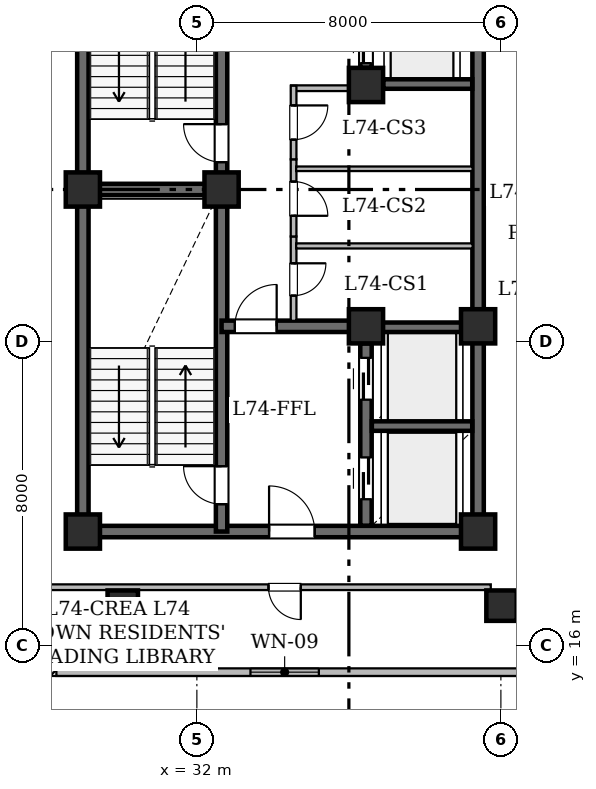
"""IFC4 building model, lengths in metres.
Left out: names, types, materials, properties, quantities, classifications, styles, units other than length and angle.
Written with IfcOpenShell. Run it as: python <this file> out.ifc"""

import sys

from ifc_helpers import new_model, si_unit, direction, frame, frame_2d, origin, origin_2d, place, context, subcontext, project, spatial, rectangle, hollow_rectangle, extrude, element, fill, save


model = new_model("IFC4")
c1 = context("Model", 3, precision=1e-05, world=origin(), true_north=direction((0.0, 1.0)))
c2 = subcontext(c1, "Body", "Model", "MODEL_VIEW")
j1 = project(units=[si_unit("LENGTHUNIT", "METRE"), si_unit("PLANEANGLEUNIT", "RADIAN")], contexts=[c1])
p1 = place(None, origin())
s1 = spatial("IfcSite", under=j1, at=p1, CompositionType="ELEMENT")
p2 = place(p1, origin())
s2 = spatial("IfcBuilding", under=s1, at=p2, CompositionType="ELEMENT")
p3 = place(p2, frame((0.0, 0.0, 290.45)))
s3 = spatial("IfcBuildingStorey", under=s2, at=p3, CompositionType="ELEMENT", Elevation=290.45)
for number, where, z_axis, x_axis in (
    (1, (29.0, 19.0, 0.0), (0.0, 0.0, 1.0), (1.0, 0.0, 0.0)),
    (2, (32.65, 28.0, 0.0), (0.0, 0.0, 1.0), (1.0, 0.0, 0.0)),
    (3, (39.4, 19.0, 0.0), (0.0, 0.0, 1.0), (1.0, 0.0, 0.0)),
    (4, (29.0, 28.0, 0.0), (0.0, 0.0, 1.0), (1.0, 0.0, 0.0)),
    (5, (36.45, 24.4, 0.0), (0.0, 0.0, 1.0), (1.0, 0.0, 0.0)),
    (6, (39.4, 24.4, 0.0), (0.0, 0.0, 1.0), (1.0, 0.0, 0.0)),
    (7, (36.45, 30.75, 0.0), (0.0, 0.0, 1.0), (1.0, 0.0, 0.0)),
):
    element("IfcColumn", number, at=place(p3, frame(where, z_axis=z_axis, x_axis=x_axis)), inside=s3, PredefinedType="COLUMN", context=c2, shape_type="SweptSolid", body=[
        extrude(hollow_rectangle(XDim=0.9, YDim=0.9, WallThickness=0.045, at=origin_2d()), origin(), (0.0, 0.0, 1.0), 4.2),
    ])
for number, where, z_axis, x_axis in (
    (8, (30.05, 17.05, 0.0), (0.0, 0.0, 1.0), (1.0, 0.0, 0.0)),
    (9, (40.017, 17.05, 0.0), (0.0, 0.0, 1.0), (1.0, 0.0, 0.0)),
):
    element("IfcColumn", number, at=place(p3, frame(where, z_axis=z_axis, x_axis=x_axis)), inside=s3, PredefinedType="COLUMN", context=c2, shape_type="SweptSolid", body=[
        extrude(hollow_rectangle(XDim=0.8, YDim=0.8, WallThickness=0.04, at=origin_2d()), origin(), (0.0, 0.0, 1.0), 4.175),
    ])
p4 = place(p3, frame((28.241, 15.3, 0.0), z_axis=(0.0, 0.0, 1.0), x_axis=(-0.707106781187, 0.707106781187, 0.0)))
e10 = element("IfcWall", 10, at=p4, inside=s3, PredefinedType="STANDARD", context=c2, shape_type="SweptSolid", body=[
    extrude(rectangle(XDim=4.442, YDim=0.2, at=frame_2d((2.221, 0.0))), origin(), (0.0, 0.0, 1.0), 3.78),
])
p5 = place(p3, frame((61.696, 15.3, 0.0), z_axis=(0.0, 0.0, 1.0), x_axis=(-1.0, 0.0, 0.0)))
e11 = element("IfcWall", 11, at=p5, inside=s3, PredefinedType="STANDARD", context=c2, shape_type="SweptSolid", body=[
    extrude(rectangle(XDim=33.393, YDim=0.2, at=frame_2d((16.697, 0.0))), origin(), (0.0, 0.0, 1.0), 3.78),
])
p6 = place(p5, frame((26.486, 0.0, 0.85)))
e12 = element("IfcOpeningElement", 12, at=p6, cuts=e11, PredefinedType="OPENING", context=c2, shape_type="SweptSolid", body=[
    extrude(rectangle(XDim=1.8, YDim=0.92, at=frame_2d((0.9, 0.46))), frame((0.0, 0.11, 0.0), z_axis=(0.0, -1.0, 0.0), x_axis=(1.0, 0.0, 0.0)), (0.0, 0.0, 1.0), 0.22),
])
p7 = place(p5, frame((12.686, 0.0, 0.85)))
e13 = element("IfcOpeningElement", 13, at=p7, cuts=e11, PredefinedType="OPENING", context=c2, shape_type="SweptSolid", body=[
    extrude(rectangle(XDim=1.8, YDim=0.92, at=frame_2d((0.9, 0.46))), frame((0.0, 0.11, 0.0), z_axis=(0.0, -1.0, 0.0), x_axis=(1.0, 0.0, 0.0)), (0.0, 0.0, 1.0), 0.22),
])
p8 = place(p5, frame((7.048, 0.0, 0.85)))
e14 = element("IfcOpeningElement", 14, at=p8, cuts=e11, PredefinedType="OPENING", context=c2, shape_type="SweptSolid", body=[
    extrude(rectangle(XDim=1.8, YDim=0.92, at=frame_2d((0.9, 0.46))), frame((0.0, 0.11, 0.0), z_axis=(0.0, -1.0, 0.0), x_axis=(1.0, 0.0, 0.0)), (0.0, 0.0, 1.0), 0.22),
])
p9 = place(p5, frame((1.844, 0.0, 0.85)))
e15 = element("IfcOpeningElement", 15, at=p9, cuts=e11, PredefinedType="OPENING", context=c2, shape_type="SweptSolid", body=[
    extrude(rectangle(XDim=1.8, YDim=0.92, at=frame_2d((0.9, 0.46))), frame((0.0, 0.11, 0.0), z_axis=(0.0, -1.0, 0.0), x_axis=(1.0, 0.0, 0.0)), (0.0, 0.0, 1.0), 0.22),
])
for number, where, z_axis, x_axis in (
    (16, (29.0, 19.0, 0.0), (0.0, 0.0, 1.0), (0.0, 1.0, 0.0)),
    (17, (29.0, 28.0, 0.0), (0.0, 0.0, 1.0), (0.0, 1.0, 0.0)),
):
    element("IfcWall", number, at=place(p3, frame(where, z_axis=z_axis, x_axis=x_axis)), inside=s3, PredefinedType="SHEAR", context=c2, shape_type="SweptSolid", body=[
        extrude(rectangle(XDim=9.0, YDim=0.3, at=frame_2d((4.5, 0.0))), origin(), (0.0, 0.0, 1.0), 3.78),
    ])
p10 = place(p3, frame((29.0, 19.0, 0.0), z_axis=(0.0, 0.0, 1.0), x_axis=(1.0, 0.0, 0.0)))
e18 = element("IfcWall", 18, at=p10, inside=s3, PredefinedType="SHEAR", context=c2, shape_type="SweptSolid", body=[
    extrude(rectangle(XDim=10.4, YDim=0.3, at=frame_2d((5.2, 0.0))), origin(), (0.0, 0.0, 1.0), 3.78),
])
p11 = place(p10, frame((4.9, 0.0, 0.0)))
e19 = element("IfcOpeningElement", 19, at=p11, cuts=e18, PredefinedType="OPENING", context=c2, shape_type="SweptSolid", body=[
    extrude(rectangle(XDim=1.2, YDim=2.15, at=frame_2d((0.6, 1.075))), frame((0.0, 0.16, 0.0), z_axis=(0.0, -1.0, 0.0), x_axis=(1.0, 0.0, 0.0)), (0.0, 0.0, 1.0), 0.32),
])
p12 = place(p3, frame((39.4, 19.0, 0.0), z_axis=(0.0, 0.0, 1.0), x_axis=(0.0, 1.0, 0.0)))
e20 = element("IfcWall", 20, at=p12, inside=s3, PredefinedType="SHEAR", context=c2, shape_type="SweptSolid", body=[
    extrude(rectangle(XDim=5.4, YDim=0.3, at=frame_2d((2.7, 0.0))), origin(), (0.0, 0.0, 1.0), 3.78),
])
p13 = place(p3, frame((39.4, 24.4, 0.0), z_axis=(0.0, 0.0, 1.0), x_axis=(0.0, 1.0, 0.0)))
e21 = element("IfcWall", 21, at=p13, inside=s3, PredefinedType="SHEAR", context=c2, shape_type="SweptSolid", body=[
    extrude(rectangle(XDim=12.6, YDim=0.3, at=frame_2d((6.3, 0.0))), origin(), (0.0, 0.0, 1.0), 3.78),
])
p14 = place(p3, frame((32.65, 19.0, 0.0), z_axis=(0.0, 0.0, 1.0), x_axis=(0.0, 1.0, 0.0)))
e22 = element("IfcWall", 22, at=p14, inside=s3, PredefinedType="SHEAR", context=c2, shape_type="SweptSolid", body=[
    extrude(rectangle(XDim=9.0, YDim=0.3, at=frame_2d((4.5, 0.0))), origin(), (0.0, 0.0, 1.0), 3.78),
])
p15 = place(p14, frame((0.72, 0.0, 0.0)))
e23 = element("IfcOpeningElement", 23, at=p15, cuts=e22, PredefinedType="OPENING", context=c2, shape_type="SweptSolid", body=[
    extrude(rectangle(XDim=1.0, YDim=2.15, at=frame_2d((0.5, 1.075))), frame((0.0, 0.16, 0.0), z_axis=(0.0, -1.0, 0.0), x_axis=(1.0, 0.0, 0.0)), (0.0, 0.0, 1.0), 0.32),
])
p16 = place(p3, frame((32.65, 28.0, 0.0), z_axis=(0.0, 0.0, 1.0), x_axis=(0.0, 1.0, 0.0)))
e24 = element("IfcWall", 24, at=p16, inside=s3, PredefinedType="SHEAR", context=c2, shape_type="SweptSolid", body=[
    extrude(rectangle(XDim=9.0, YDim=0.3, at=frame_2d((4.5, 0.0))), origin(), (0.0, 0.0, 1.0), 3.78),
])
p17 = place(p16, frame((0.72, 0.0, 0.0)))
e25 = element("IfcOpeningElement", 25, at=p17, cuts=e24, PredefinedType="OPENING", context=c2, shape_type="SweptSolid", body=[
    extrude(rectangle(XDim=1.0, YDim=2.15, at=frame_2d((0.5, 1.075))), frame((0.0, 0.16, 0.0), z_axis=(0.0, -1.0, 0.0), x_axis=(1.0, 0.0, 0.0)), (0.0, 0.0, 1.0), 0.32),
])
p18 = place(p3, frame((29.0, 28.0, 0.0), z_axis=(0.0, 0.0, 1.0), x_axis=(1.0, 0.0, 0.0)))
e26 = element("IfcWall", 26, at=p18, inside=s3, PredefinedType="SHEAR", context=c2, shape_type="SweptSolid", body=[
    extrude(rectangle(XDim=3.65, YDim=0.3, at=frame_2d((1.825, 0.0))), origin(), (0.0, 0.0, 1.0), 3.78),
])
p19 = place(p3, frame((32.65, 24.4, 0.0), z_axis=(0.0, 0.0, 1.0), x_axis=(1.0, 0.0, 0.0)))
e27 = element("IfcWall", 27, at=p19, inside=s3, PredefinedType="SHEAR", context=c2, shape_type="SweptSolid", body=[
    extrude(rectangle(XDim=3.8, YDim=0.3, at=frame_2d((1.9, 0.0))), origin(), (0.0, 0.0, 1.0), 3.78),
])
p20 = place(p19, frame((0.35, 0.0, 0.0)))
e28 = element("IfcOpeningElement", 28, at=p20, cuts=e27, PredefinedType="OPENING", context=c2, shape_type="SweptSolid", body=[
    extrude(rectangle(XDim=1.1, YDim=2.15, at=frame_2d((0.55, 1.075))), frame((0.0, 0.16, 0.0), z_axis=(0.0, -1.0, 0.0), x_axis=(1.0, 0.0, 0.0)), (0.0, 0.0, 1.0), 0.32),
])
p21 = place(p3, frame((36.45, 19.154, 0.0), z_axis=(0.0, 0.0, 1.0), x_axis=(0.0, 1.0, 0.0)))
e29 = element("IfcWall", 29, at=p21, inside=s3, PredefinedType="SHEAR", context=c2, shape_type="SweptSolid", body=[
    extrude(rectangle(XDim=4.796, YDim=0.3, at=frame_2d((2.398, 0.0))), origin(), (0.0, 0.0, 1.0), 3.78),
])
p22 = place(p21, frame((0.696, 0.0, 0.0)))
e30 = element("IfcOpeningElement", 30, at=p22, cuts=e29, PredefinedType="OPENING", context=c2, shape_type="SweptSolid", body=[
    extrude(rectangle(XDim=1.1, YDim=2.15, at=frame_2d((0.55, 1.075))), frame((0.0, 0.16, 0.0), z_axis=(0.0, -1.0, 0.0), x_axis=(1.0, 0.0, 0.0)), (0.0, 0.0, 1.0), 0.32),
])
p23 = place(p21, frame((3.316, 0.0, 0.0)))
e31 = element("IfcOpeningElement", 31, at=p23, cuts=e29, PredefinedType="OPENING", context=c2, shape_type="SweptSolid", body=[
    extrude(rectangle(XDim=1.1, YDim=2.15, at=frame_2d((0.55, 1.075))), frame((0.0, 0.16, 0.0), z_axis=(0.0, -1.0, 0.0), x_axis=(1.0, 0.0, 0.0)), (0.0, 0.0, 1.0), 0.32),
])
p24 = place(p3, frame((36.45, 31.2, 0.0), z_axis=(0.0, 0.0, 1.0), x_axis=(0.0, 1.0, 0.0)))
e32 = element("IfcWall", 32, at=p24, inside=s3, PredefinedType="SHEAR", context=c2, shape_type="SweptSolid", body=[
    extrude(rectangle(XDim=5.646, YDim=0.3, at=frame_2d((2.823, 0.0))), origin(), (0.0, 0.0, 1.0), 3.78),
])
p25 = place(p24, frame((0.125, 0.0, 0.0)))
e33 = element("IfcOpeningElement", 33, at=p25, cuts=e32, PredefinedType="OPENING", context=c2, shape_type="SweptSolid", body=[
    extrude(rectangle(XDim=1.05, YDim=2.15, at=frame_2d((0.525, 1.075))), frame((0.0, 0.16, 0.0), z_axis=(0.0, -1.0, 0.0), x_axis=(1.0, 0.0, 0.0)), (0.0, 0.0, 1.0), 0.32),
])
p26 = place(p24, frame((2.175, 0.0, 0.0)))
e34 = element("IfcOpeningElement", 34, at=p26, cuts=e32, PredefinedType="OPENING", context=c2, shape_type="SweptSolid", body=[
    extrude(rectangle(XDim=1.05, YDim=2.15, at=frame_2d((0.525, 1.075))), frame((0.0, 0.16, 0.0), z_axis=(0.0, -1.0, 0.0), x_axis=(1.0, 0.0, 0.0)), (0.0, 0.0, 1.0), 0.32),
])
p27 = place(p24, frame((4.195, 0.0, 0.0)))
e35 = element("IfcOpeningElement", 35, at=p27, cuts=e32, PredefinedType="OPENING", context=c2, shape_type="SweptSolid", body=[
    extrude(rectangle(XDim=1.05, YDim=2.15, at=frame_2d((0.525, 1.075))), frame((0.0, 0.16, 0.0), z_axis=(0.0, -1.0, 0.0), x_axis=(1.0, 0.0, 0.0)), (0.0, 0.0, 1.0), 0.32),
])
for number, where, z_axis, x_axis in (
    (36, (36.604, 21.775, 0.0), (0.0, 0.0, 1.0), (1.0, 0.0, 0.0)),
    (37, (36.604, 24.375, 0.0), (0.0, 0.0, 1.0), (1.0, 0.0, 0.0)),
):
    element("IfcWall", number, at=place(p3, frame(where, z_axis=z_axis, x_axis=x_axis)), inside=s3, PredefinedType="SHEAR", context=c2, shape_type="SweptSolid", body=[
        extrude(rectangle(XDim=2.642, YDim=0.25, at=frame_2d((1.321, 0.0))), origin(), (0.0, 0.0, 1.0), 3.78),
    ])
p28 = place(p3, frame((36.904, 30.775, 0.0), z_axis=(0.0, 0.0, 1.0), x_axis=(1.0, 0.0, 0.0)))
e38 = element("IfcWall", 38, at=p28, inside=s3, PredefinedType="SHEAR", context=c2, shape_type="SweptSolid", body=[
    extrude(rectangle(XDim=2.342, YDim=0.25, at=frame_2d((1.171, 0.0))), origin(), (0.0, 0.0, 1.0), 3.78),
])
p29 = place(p3, frame((34.545, 26.764, 0.0), z_axis=(0.0, 0.0, 1.0), x_axis=(0.0, -1.0, 0.0)))
e39 = element("IfcWall", 39, at=p29, inside=s3, PredefinedType="STANDARD", context=c2, shape_type="SweptSolid", body=[
    extrude(rectangle(XDim=2.22, YDim=0.15, at=frame_2d((1.11, 0.0))), origin(), (0.0, 0.0, 1.0), 3.78),
])
p30 = place(p29, frame((0.706, 0.0, 0.0)))
e40 = element("IfcOpeningElement", 40, at=p30, cuts=e39, PredefinedType="OPENING", context=c2, shape_type="SweptSolid", body=[
    extrude(rectangle(XDim=0.85, YDim=2.1, at=frame_2d((0.425, 1.05))), frame((0.0, 0.085, 0.0), z_axis=(0.0, -1.0, 0.0), x_axis=(1.0, 0.0, 0.0)), (0.0, 0.0, 1.0), 0.17),
])
p31 = place(p3, frame((34.545, 28.794, 0.0), z_axis=(0.0, 0.0, 1.0), x_axis=(0.0, -1.0, 0.0)))
e41 = element("IfcWall", 41, at=p31, inside=s3, PredefinedType="STANDARD", context=c2, shape_type="SweptSolid", body=[
    extrude(rectangle(XDim=2.03, YDim=0.15, at=frame_2d((1.015, 0.0))), origin(), (0.0, 0.0, 1.0), 3.78),
])
p32 = place(p31, frame((0.586, 0.0, 0.0)))
e42 = element("IfcOpeningElement", 42, at=p32, cuts=e41, PredefinedType="OPENING", context=c2, shape_type="SweptSolid", body=[
    extrude(rectangle(XDim=0.9, YDim=2.1, at=frame_2d((0.45, 1.05))), frame((0.0, 0.085, 0.0), z_axis=(0.0, -1.0, 0.0), x_axis=(1.0, 0.0, 0.0)), (0.0, 0.0, 1.0), 0.17),
])
p33 = place(p3, frame((36.3, 30.665, 0.0), z_axis=(0.0, 0.0, 1.0), x_axis=(-1.0, 0.0, 0.0)))
e43 = element("IfcWall", 43, at=p33, inside=s3, PredefinedType="STANDARD", context=c2, shape_type="SweptSolid", body=[
    extrude(rectangle(XDim=1.82, YDim=0.15, at=frame_2d((0.91, 0.0))), origin(), (0.0, 0.0, 1.0), 3.78),
])
p34 = place(p3, frame((34.545, 30.73, 0.0), z_axis=(0.0, 0.0, 1.0), x_axis=(0.0, -1.0, 0.0)))
e44 = element("IfcWall", 44, at=p34, inside=s3, PredefinedType="STANDARD", context=c2, shape_type="SweptSolid", body=[
    extrude(rectangle(XDim=1.936, YDim=0.15, at=frame_2d((0.968, 0.0))), origin(), (0.0, 0.0, 1.0), 3.78),
])
p35 = place(p34, frame((0.518, 0.0, 0.0)))
e45 = element("IfcOpeningElement", 45, at=p35, cuts=e44, PredefinedType="OPENING", context=c2, shape_type="SweptSolid", body=[
    extrude(rectangle(XDim=0.9, YDim=2.1, at=frame_2d((0.45, 1.05))), frame((0.0, 0.085, 0.0), z_axis=(0.0, -1.0, 0.0), x_axis=(1.0, 0.0, 0.0)), (0.0, 0.0, 1.0), 0.17),
])
p36 = place(p3, frame((34.612, 26.515, 0.0), z_axis=(0.0, 0.0, 1.0), x_axis=(1.0, 0.0, 0.0)))
e46 = element("IfcWall", 46, at=p36, inside=s3, PredefinedType="PARTITIONING", context=c2, shape_type="SweptSolid", body=[
    extrude(rectangle(XDim=4.644, YDim=0.135, at=frame_2d((2.322, 0.0))), origin(), (0.0, 0.0, 1.0), 3.78),
])
p37 = place(p3, frame((34.612, 28.545, 0.0), z_axis=(0.0, 0.0, 1.0), x_axis=(1.0, 0.0, 0.0)))
e47 = element("IfcWall", 47, at=p37, inside=s3, PredefinedType="PARTITIONING", context=c2, shape_type="SweptSolid", body=[
    extrude(rectangle(XDim=4.644, YDim=0.12, at=frame_2d((2.322, 0.0))), origin(), (0.0, 0.0, 1.0), 3.78),
])
p38 = place(p3, frame((39.734, 17.535, 0.0), z_axis=(0.0, 0.0, 1.0), x_axis=(-1.0, 0.0, 0.0)))
e48 = element("IfcWall", 48, at=p38, inside=s3, PredefinedType="STANDARD", context=c2, shape_type="SweptSolid", body=[
    extrude(rectangle(XDim=13.582, YDim=0.15, at=frame_2d((6.791, 0.0))), origin(), (0.0, 0.0, 1.0), 2.22),
])
p39 = place(p38, frame((4.999, 0.0, 0.0)))
e49 = element("IfcOpeningElement", 49, at=p39, cuts=e48, PredefinedType="OPENING", context=c2, shape_type="SweptSolid", body=[
    extrude(rectangle(XDim=0.85, YDim=2.1, at=frame_2d((0.425, 1.05))), frame((0.0, 0.085, 0.0), z_axis=(0.0, -1.0, 0.0), x_axis=(1.0, 0.0, 0.0)), (0.0, 0.0, 1.0), 0.17),
])
p40 = place(p6, origin())
e50 = element("IfcWindow", 50, at=p40, inside=s3, PartitioningType="SINGLE_PANEL", PredefinedType="WINDOW", context=c2, shape_type="SweptSolid", body=[
    extrude(rectangle(XDim=1.8, YDim=0.92, at=frame_2d((0.9, 0.46))), frame((0.0, 0.03, 0.0), z_axis=(0.0, -1.0, 0.0), x_axis=(1.0, 0.0, 0.0)), (0.0, 0.0, 1.0), 0.06),
])
fill(e12, e50)
p41 = place(p15, origin())
e51 = element("IfcDoor", 51, at=p41, inside=s3, OperationType="SINGLE_SWING_RIGHT", PredefinedType="DOOR", context=c2, shape_type="SweptSolid", body=[
    extrude(rectangle(XDim=1.0, YDim=2.15, at=frame_2d((0.5, 1.075))), frame((0.0, 0.025, 0.0), z_axis=(0.0, -1.0, 0.0), x_axis=(1.0, 0.0, 0.0)), (0.0, 0.0, 1.0), 0.05),
])
fill(e23, e51)
p42 = place(p17, origin())
e52 = element("IfcDoor", 52, at=p42, inside=s3, OperationType="SINGLE_SWING_RIGHT", PredefinedType="DOOR", context=c2, shape_type="SweptSolid", body=[
    extrude(rectangle(XDim=1.0, YDim=2.15, at=frame_2d((0.5, 1.075))), frame((0.0, 0.025, 0.0), z_axis=(0.0, -1.0, 0.0), x_axis=(1.0, 0.0, 0.0)), (0.0, 0.0, 1.0), 0.05),
])
fill(e25, e52)
p43 = place(p20, origin())
e53 = element("IfcDoor", 53, at=p43, inside=s3, OperationType="SINGLE_SWING_RIGHT", PredefinedType="DOOR", context=c2, shape_type="SweptSolid", body=[
    extrude(rectangle(XDim=1.1, YDim=2.15, at=frame_2d((0.55, 1.075))), frame((0.0, 0.025, 0.0), z_axis=(0.0, -1.0, 0.0), x_axis=(1.0, 0.0, 0.0)), (0.0, 0.0, 1.0), 0.05),
])
fill(e28, e53)
p44 = place(p11, origin())
e54 = element("IfcDoor", 54, at=p44, inside=s3, OperationType="SINGLE_SWING_LEFT", PredefinedType="DOOR", context=c2, shape_type="SweptSolid", body=[
    extrude(rectangle(XDim=1.2, YDim=2.15, at=frame_2d((0.6, 1.075))), frame((0.0, 0.025, 0.0), z_axis=(0.0, -1.0, 0.0), x_axis=(1.0, 0.0, 0.0)), (0.0, 0.0, 1.0), 0.05),
])
fill(e19, e54)
p45 = place(p22, origin())
e55 = element("IfcDoor", 55, at=p45, inside=s3, OperationType="SLIDING_TO_LEFT", PredefinedType="DOOR", context=c2, shape_type="SweptSolid", body=[
    extrude(rectangle(XDim=1.1, YDim=2.15, at=frame_2d((0.55, 1.075))), frame((0.0, 0.025, 0.0), z_axis=(0.0, -1.0, 0.0), x_axis=(1.0, 0.0, 0.0)), (0.0, 0.0, 1.0), 0.05),
])
fill(e30, e55)
p46 = place(p23, origin())
e56 = element("IfcDoor", 56, at=p46, inside=s3, OperationType="SLIDING_TO_LEFT", PredefinedType="DOOR", context=c2, shape_type="SweptSolid", body=[
    extrude(rectangle(XDim=1.1, YDim=2.15, at=frame_2d((0.55, 1.075))), frame((0.0, 0.025, 0.0), z_axis=(0.0, -1.0, 0.0), x_axis=(1.0, 0.0, 0.0)), (0.0, 0.0, 1.0), 0.05),
])
fill(e31, e56)
p47 = place(p25, origin())
e57 = element("IfcDoor", 57, at=p47, inside=s3, OperationType="SLIDING_TO_LEFT", PredefinedType="DOOR", context=c2, shape_type="SweptSolid", body=[
    extrude(rectangle(XDim=1.05, YDim=2.15, at=frame_2d((0.525, 1.075))), frame((0.0, 0.025, 0.0), z_axis=(0.0, -1.0, 0.0), x_axis=(1.0, 0.0, 0.0)), (0.0, 0.0, 1.0), 0.05),
])
fill(e33, e57)
p48 = place(p30, origin())
e58 = element("IfcDoor", 58, at=p48, inside=s3, OperationType="SINGLE_SWING_LEFT", PredefinedType="DOOR", context=c2, shape_type="SweptSolid", body=[
    extrude(rectangle(XDim=0.85, YDim=2.1, at=frame_2d((0.425, 1.05))), frame((0.0, 0.025, 0.0), z_axis=(0.0, -1.0, 0.0), x_axis=(1.0, 0.0, 0.0)), (0.0, 0.0, 1.0), 0.05),
])
fill(e40, e58)
p49 = place(p32, origin())
e59 = element("IfcDoor", 59, at=p49, inside=s3, OperationType="SINGLE_SWING_RIGHT", PredefinedType="DOOR", context=c2, shape_type="SweptSolid", body=[
    extrude(rectangle(XDim=0.9, YDim=2.1, at=frame_2d((0.45, 1.05))), frame((0.0, 0.025, 0.0), z_axis=(0.0, -1.0, 0.0), x_axis=(1.0, 0.0, 0.0)), (0.0, 0.0, 1.0), 0.05),
])
fill(e42, e59)
p50 = place(p35, origin())
e60 = element("IfcDoor", 60, at=p50, inside=s3, OperationType="SINGLE_SWING_LEFT", PredefinedType="DOOR", context=c2, shape_type="SweptSolid", body=[
    extrude(rectangle(XDim=0.9, YDim=2.1, at=frame_2d((0.45, 1.05))), frame((0.0, 0.025, 0.0), z_axis=(0.0, -1.0, 0.0), x_axis=(1.0, 0.0, 0.0)), (0.0, 0.0, 1.0), 0.05),
])
fill(e45, e60)
p51 = place(p39, origin())
e61 = element("IfcDoor", 61, at=p51, inside=s3, OperationType="SINGLE_SWING_LEFT", PredefinedType="DOOR", context=c2, shape_type="SweptSolid", body=[
    extrude(rectangle(XDim=0.85, YDim=2.1, at=frame_2d((0.425, 1.05))), frame((0.0, 0.025, 0.0), z_axis=(0.0, -1.0, 0.0), x_axis=(1.0, 0.0, 0.0)), (0.0, 0.0, 1.0), 0.05),
])
fill(e49, e61)
save(model, sys.argv[1])
